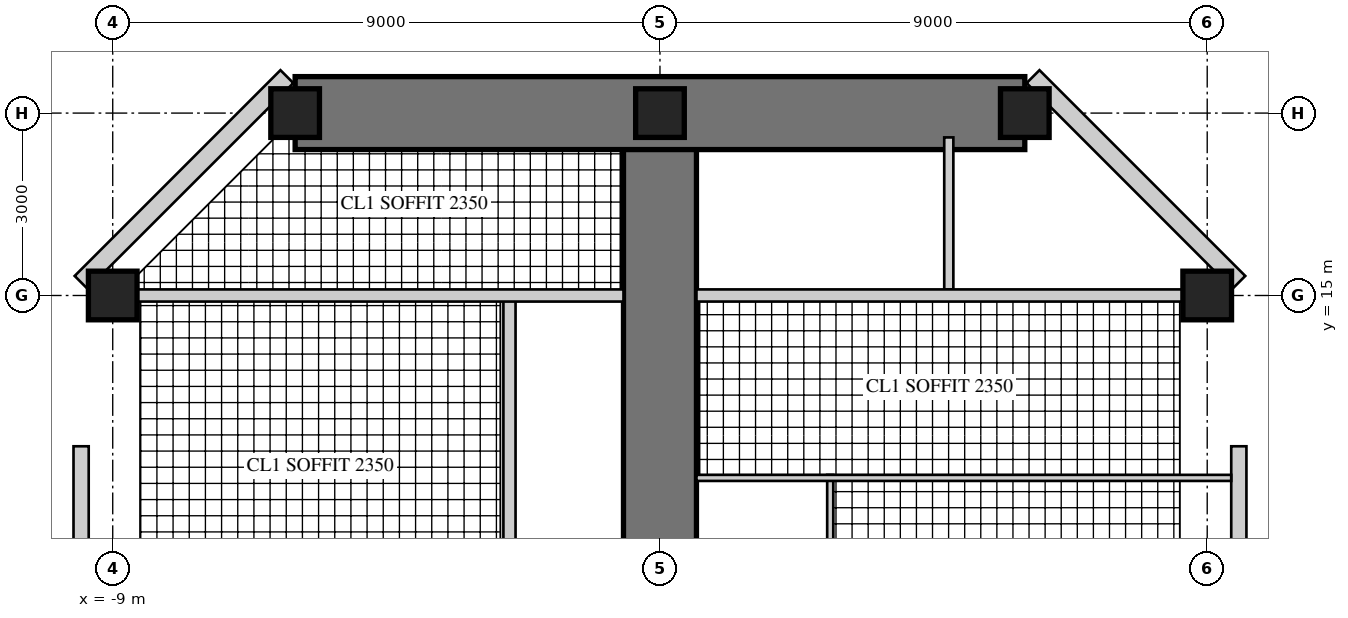
"""IFC4 building model, lengths in metres.
Left out: names, types, materials, properties, quantities, classifications, styles, units other than length and angle.
Written with IfcOpenShell. Run it as: python <this file> out.ifc"""

import sys

from ifc_helpers import new_model, si_unit, direction, frame, frame_2d, origin, origin_2d, place, context, subcontext, project, spatial, rectangle, hollow_rectangle, extrude, element, fill, save


model = new_model("IFC4")
c1 = context("Model", 3, precision=1e-05, world=origin(), true_north=direction((0.0, 1.0)))
c2 = subcontext(c1, "Body", "Model", "MODEL_VIEW")
j1 = project(units=[si_unit("LENGTHUNIT", "METRE"), si_unit("PLANEANGLEUNIT", "RADIAN")], contexts=[c1])
p1 = place(None, origin())
s1 = spatial("IfcSite", under=j1, at=p1, CompositionType="ELEMENT")
p2 = place(p1, origin())
s2 = spatial("IfcBuilding", under=s1, at=p2, CompositionType="ELEMENT")
p3 = place(p2, frame((0.0, 0.0, 242.5)))
s3 = spatial("IfcBuildingStorey", under=s2, at=p3, CompositionType="ELEMENT", Elevation=242.5)
p4 = place(p3, frame((0.0, 9.0, 0.0), z_axis=(0.0, 0.0, 1.0), x_axis=(0.0, 1.0, 0.0)))
e1 = element("IfcWall", 1, at=p4, inside=s3, PredefinedType="SHEAR", context=c2, shape_type="SweptSolid", body=[
    extrude(rectangle(XDim=9.0, YDim=1.2, at=frame_2d((4.5, 0.0))), origin(), (0.0, 0.0, 1.0), 3.4),
])
p5 = place(p4, frame((3.8, 0.0, 0.0)))
e2 = element("IfcOpeningElement", 2, at=p5, cuts=e1, PredefinedType="OPENING", context=c2, shape_type="SweptSolid", body=[
    extrude(rectangle(XDim=1.0, YDim=2.15, at=frame_2d((0.5, 1.075))), frame((0.0, 0.61, 0.0), z_axis=(0.0, -1.0, 0.0), x_axis=(1.0, 0.0, 0.0)), (0.0, 0.0, 1.0), 1.22),
])
p6 = place(p4, frame((7.0, 0.0, 0.0)))
e3 = element("IfcOpeningElement", 3, at=p6, cuts=e1, PredefinedType="OPENING", context=c2, shape_type="SweptSolid", body=[
    extrude(rectangle(XDim=1.0, YDim=2.2, at=frame_2d((0.5, 1.1))), frame((0.0, 0.61, 0.0), z_axis=(0.0, -1.0, 0.0), x_axis=(1.0, 0.0, 0.0)), (0.0, 0.0, 1.0), 1.22),
])
p7 = place(p3, frame((6.0, 18.0, 0.0), z_axis=(0.0, 0.0, 1.0), x_axis=(-1.0, 0.0, 0.0)))
e4 = element("IfcWall", 4, at=p7, inside=s3, PredefinedType="SHEAR", context=c2, shape_type="SweptSolid", body=[
    extrude(rectangle(XDim=12.0, YDim=1.2, at=frame_2d((6.0, 0.0))), origin(), (0.0, 0.0, 1.0), 3.4),
])
p8 = place(p7, frame((1.5, 0.0, 0.6)))
e5 = element("IfcOpeningElement", 5, at=p8, cuts=e4, PredefinedType="OPENING", context=c2, shape_type="SweptSolid", body=[
    extrude(rectangle(XDim=3.0, YDim=2.4, at=frame_2d((1.5, 1.2))), frame((0.0, 0.61, 0.0), z_axis=(0.0, -1.0, 0.0), x_axis=(1.0, 0.0, 0.0)), (0.0, 0.0, 1.0), 1.22),
])
p9 = place(p7, frame((7.5, 0.0, 0.6)))
e6 = element("IfcOpeningElement", 6, at=p9, cuts=e4, PredefinedType="OPENING", context=c2, shape_type="SweptSolid", body=[
    extrude(rectangle(XDim=3.0, YDim=2.4, at=frame_2d((1.5, 1.2))), frame((0.0, 0.61, 0.0), z_axis=(0.0, -1.0, 0.0), x_axis=(1.0, 0.0, 0.0)), (0.0, 0.0, 1.0), 1.22),
])
for number, where, z_axis, x_axis in (
    (7, (9.0, 15.0, 0.0), (0.0, 0.0, 1.0), (1.0, 0.0, 0.0)),
    (8, (-9.0, 15.0, 0.0), (0.0, 0.0, 1.0), (1.0, 0.0, 0.0)),
    (9, (6.0, 18.0, 0.0), (0.0, 0.0, 1.0), (1.0, 0.0, 0.0)),
    (10, (0.0, 18.0, 0.0), (0.0, 0.0, 1.0), (1.0, 0.0, 0.0)),
    (11, (-6.0, 18.0, 0.0), (0.0, 0.0, 1.0), (1.0, 0.0, 0.0)),
):
    element("IfcColumn", number, at=place(p3, frame(where, z_axis=z_axis, x_axis=x_axis)), inside=s3, PredefinedType="COLUMN", context=c2, shape_type="SweptSolid", body=[
        extrude(rectangle(XDim=0.8, YDim=0.8, at=origin_2d()), origin(), (0.0, 0.0, 1.0), 3.4),
    ])
p10 = place(p3, frame((9.52, 9.395, 0.0), z_axis=(0.0, 0.0, 1.0), x_axis=(0.0, 1.0, 0.0)))
e12 = element("IfcWall", 12, at=p10, inside=s3, PredefinedType="SOLIDWALL", context=c2, shape_type="SweptSolid", body=[
    extrude(rectangle(XDim=3.125, YDim=0.25, at=frame_2d((1.562, 0.0))), origin(), (0.0, 0.0, 1.0), 3.22),
])
p11 = place(p10, frame((0.6, 0.0, 0.0)))
e13 = element("IfcOpeningElement", 13, at=p11, cuts=e12, PredefinedType="OPENING", context=c2, shape_type="SweptSolid", body=[
    extrude(rectangle(XDim=1.0, YDim=2.2, at=frame_2d((0.5, 1.1))), frame((0.0, 0.135, 0.0), z_axis=(0.0, -1.0, 0.0), x_axis=(1.0, 0.0, 0.0)), (0.0, 0.0, 1.0), 0.27),
])
p12 = place(p3, frame((9.52, 15.215, 0.0), z_axis=(0.0, 0.0, 1.0), x_axis=(-0.707081278264, 0.707132283189, 0.0)))
e14 = element("IfcWall", 14, at=p12, inside=s3, PredefinedType="SOLIDWALL", context=c2, shape_type="SweptSolid", body=[
    extrude(rectangle(XDim=4.787, YDim=0.3, at=frame_2d((2.393, 0.0))), origin(), (0.0, 0.0, 1.0), 3.22),
])
p13 = place(p12, frame((1.943, 0.0, 0.3)))
e15 = element("IfcOpeningElement", 15, at=p13, cuts=e14, PredefinedType="OPENING", context=c2, shape_type="SweptSolid", body=[
    extrude(rectangle(XDim=0.9, YDim=2.4, at=frame_2d((0.45, 1.2))), frame((0.0, 0.16, 0.0), z_axis=(0.0, -1.0, 0.0), x_axis=(1.0, 0.0, 0.0)), (0.0, 0.0, 1.0), 0.32),
])
p14 = place(p3, frame((-6.135, 18.6, 0.0), z_axis=(0.0, 0.0, 1.0), x_axis=(-0.707081278264, -0.707132283189, 0.0)))
e16 = element("IfcWall", 16, at=p14, inside=s3, PredefinedType="SOLIDWALL", context=c2, shape_type="SweptSolid", body=[
    extrude(rectangle(XDim=4.787, YDim=0.3, at=frame_2d((2.393, 0.0))), origin(), (0.0, 0.0, 1.0), 3.22),
])
p15 = place(p14, frame((1.943, 0.0, 0.3)))
e17 = element("IfcOpeningElement", 17, at=p15, cuts=e16, PredefinedType="OPENING", context=c2, shape_type="SweptSolid", body=[
    extrude(rectangle(XDim=0.9, YDim=2.4, at=frame_2d((0.45, 1.2))), frame((0.0, 0.16, 0.0), z_axis=(0.0, -1.0, 0.0), x_axis=(1.0, 0.0, 0.0)), (0.0, 0.0, 1.0), 0.32),
])
p16 = place(p3, frame((-9.52, 12.52, 0.0), z_axis=(0.0, 0.0, 1.0), x_axis=(0.0, -1.0, 0.0)))
e18 = element("IfcWall", 18, at=p16, inside=s3, PredefinedType="SOLIDWALL", context=c2, shape_type="SweptSolid", body=[
    extrude(rectangle(XDim=2.875, YDim=0.25, at=frame_2d((1.438, 0.0))), origin(), (0.0, 0.0, 1.0), 3.22),
])
p17 = place(p16, frame((0.6, 0.0, 0.0)))
e19 = element("IfcOpeningElement", 19, at=p17, cuts=e18, PredefinedType="OPENING", context=c2, shape_type="SweptSolid", body=[
    extrude(rectangle(XDim=1.0, YDim=2.2, at=frame_2d((0.5, 1.1))), frame((0.0, 0.135, 0.0), z_axis=(0.0, -1.0, 0.0), x_axis=(1.0, 0.0, 0.0)), (0.0, 0.0, 1.0), 0.27),
])
p18 = place(p3, frame((2.8, 9.4, 0.0), z_axis=(0.0, 0.0, 1.0), x_axis=(0.0, 1.0, 0.0)))
e20 = element("IfcWall", 20, at=p18, inside=s3, PredefinedType="PARTITIONING", context=c2, shape_type="SweptSolid", body=[
    extrude(rectangle(XDim=2.65, YDim=0.1, at=frame_2d((1.325, 0.0))), origin(), (0.0, 0.0, 1.0), 3.22),
])
p19 = place(p3, frame((9.395, 12.0, 0.0), z_axis=(0.0, 0.0, 1.0), x_axis=(-1.0, 0.0, 0.0)))
e21 = element("IfcWall", 21, at=p19, inside=s3, PredefinedType="PARTITIONING", context=c2, shape_type="SweptSolid", body=[
    extrude(rectangle(XDim=8.795, YDim=0.1, at=frame_2d((4.397, 0.0))), origin(), (0.0, 0.0, 1.0), 3.22),
])
p20 = place(p19, frame((5.245, 0.0, 0.0)))
e22 = element("IfcOpeningElement", 22, at=p20, cuts=e21, PredefinedType="OPENING", context=c2, shape_type="SweptSolid", body=[
    extrude(rectangle(XDim=0.9, YDim=2.1, at=frame_2d((0.45, 1.05))), frame((0.0, 0.06, 0.0), z_axis=(0.0, -1.0, 0.0), x_axis=(1.0, 0.0, 0.0)), (0.0, 0.0, 1.0), 0.12),
])
p21 = place(p19, frame((7.345, 0.0, 0.0)))
e23 = element("IfcOpeningElement", 23, at=p21, cuts=e21, PredefinedType="OPENING", context=c2, shape_type="SweptSolid", body=[
    extrude(rectangle(XDim=0.9, YDim=2.1, at=frame_2d((0.45, 1.05))), frame((0.0, 0.06, 0.0), z_axis=(0.0, -1.0, 0.0), x_axis=(1.0, 0.0, 0.0)), (0.0, 0.0, 1.0), 0.12),
])
p22 = place(p3, frame((-2.475, 9.4, 0.0), z_axis=(0.0, 0.0, 1.0), x_axis=(0.0, 1.0, 0.0)))
e24 = element("IfcWall", 24, at=p22, inside=s3, PredefinedType="SOLIDWALL", context=c2, shape_type="SweptSolid", body=[
    extrude(rectangle(XDim=5.6, YDim=0.2, at=frame_2d((2.8, 0.0))), origin(), (0.0, 0.0, 1.0), 3.22),
])
p23 = place(p22, frame((1.2, 0.0, 0.0)))
e25 = element("IfcOpeningElement", 25, at=p23, cuts=e24, PredefinedType="OPENING", context=c2, shape_type="SweptSolid", body=[
    extrude(rectangle(XDim=1.0, YDim=2.2, at=frame_2d((0.5, 1.1))), frame((0.0, 0.11, 0.0), z_axis=(0.0, -1.0, 0.0), x_axis=(1.0, 0.0, 0.0)), (0.0, 0.0, 1.0), 0.22),
])
p24 = place(p3, frame((4.75, 15.1, 0.0), z_axis=(0.0, 0.0, 1.0), x_axis=(0.0, 1.0, 0.0)))
e26 = element("IfcWall", 26, at=p24, inside=s3, PredefinedType="PARTITIONING", context=c2, shape_type="SweptSolid", body=[
    extrude(rectangle(XDim=2.5, YDim=0.15, at=frame_2d((1.25, 0.0))), origin(), (0.0, 0.0, 1.0), 3.22),
])
p25 = place(p24, frame((0.6, 0.0, 0.0)))
e27 = element("IfcOpeningElement", 27, at=p25, cuts=e26, PredefinedType="OPENING", context=c2, shape_type="SweptSolid", body=[
    extrude(rectangle(XDim=1.0, YDim=2.1, at=frame_2d((0.5, 1.05))), frame((0.0, 0.085, 0.0), z_axis=(0.0, -1.0, 0.0), x_axis=(1.0, 0.0, 0.0)), (0.0, 0.0, 1.0), 0.17),
])
p26 = place(p3, frame((8.6, 15.0, 0.0), z_axis=(0.0, 0.0, 1.0), x_axis=(-1.0, 0.0, 0.0)))
e28 = element("IfcWall", 28, at=p26, inside=s3, PredefinedType="SOLIDWALL", context=c2, shape_type="SweptSolid", body=[
    extrude(rectangle(XDim=8.0, YDim=0.2, at=frame_2d((4.0, 0.0))), origin(), (0.0, 0.0, 1.0), 2.52),
])
p27 = place(p3, frame((-0.6, 15.0, 0.0), z_axis=(0.0, 0.0, 1.0), x_axis=(-1.0, 0.0, 0.0)))
e29 = element("IfcWall", 29, at=p27, inside=s3, PredefinedType="SOLIDWALL", context=c2, shape_type="SweptSolid", body=[
    extrude(rectangle(XDim=8.0, YDim=0.2, at=frame_2d((4.0, 0.0))), origin(), (0.0, 0.0, 1.0), 2.52),
])
p28 = place(p27, frame((0.35, 0.0, 0.0)))
e30 = element("IfcOpeningElement", 30, at=p28, cuts=e29, PredefinedType="OPENING", context=c2, shape_type="SweptSolid", body=[
    extrude(rectangle(XDim=1.0, YDim=2.2, at=frame_2d((0.5, 1.1))), frame((0.0, 0.11, 0.0), z_axis=(0.0, -1.0, 0.0), x_axis=(1.0, 0.0, 0.0)), (0.0, 0.0, 1.0), 0.22),
])
p29 = place(p13, origin())
e31 = element("IfcWindow", 31, at=p29, inside=s3, PartitioningType="SINGLE_PANEL", PredefinedType="WINDOW", context=c2, shape_type="SweptSolid", body=[
    extrude(hollow_rectangle(XDim=0.9, YDim=2.4, WallThickness=0.06, at=frame_2d((0.45, 1.2))), frame((0.0, 0.03, 0.0), z_axis=(0.0, -1.0, 0.0), x_axis=(1.0, 0.0, 0.0)), (0.0, 0.0, 1.0), 0.06),
    extrude(rectangle(XDim=0.779, YDim=2.279, at=frame_2d((0.45, 1.2))), frame((0.0, 0.03, 0.0), z_axis=(0.0, -1.0, 0.0), x_axis=(1.0, 0.0, 0.0)), (0.0, 0.0, 1.0), 0.06),
])
fill(e15, e31)
p30 = place(p8, origin())
e32 = element("IfcWindow", 32, at=p30, inside=s3, PartitioningType="SINGLE_PANEL", PredefinedType="WINDOW", context=c2, shape_type="SweptSolid", body=[
    extrude(hollow_rectangle(XDim=3.0, YDim=2.4, WallThickness=0.06, at=frame_2d((1.5, 1.2))), frame((0.0, 0.03, 0.0), z_axis=(0.0, -1.0, 0.0), x_axis=(1.0, 0.0, 0.0)), (0.0, 0.0, 1.0), 0.06),
    extrude(rectangle(XDim=2.879, YDim=2.279, at=frame_2d((1.5, 1.2))), frame((0.0, 0.03, 0.0), z_axis=(0.0, -1.0, 0.0), x_axis=(1.0, 0.0, 0.0)), (0.0, 0.0, 1.0), 0.06),
])
fill(e5, e32)
p31 = place(p9, origin())
e33 = element("IfcWindow", 33, at=p31, inside=s3, PartitioningType="SINGLE_PANEL", PredefinedType="WINDOW", context=c2, shape_type="SweptSolid", body=[
    extrude(hollow_rectangle(XDim=3.0, YDim=2.4, WallThickness=0.06, at=frame_2d((1.5, 1.2))), frame((0.0, 0.03, 0.0), z_axis=(0.0, -1.0, 0.0), x_axis=(1.0, 0.0, 0.0)), (0.0, 0.0, 1.0), 0.06),
    extrude(rectangle(XDim=2.879, YDim=2.279, at=frame_2d((1.5, 1.2))), frame((0.0, 0.03, 0.0), z_axis=(0.0, -1.0, 0.0), x_axis=(1.0, 0.0, 0.0)), (0.0, 0.0, 1.0), 0.06),
])
fill(e6, e33)
p32 = place(p15, origin())
e34 = element("IfcWindow", 34, at=p32, inside=s3, PartitioningType="SINGLE_PANEL", PredefinedType="WINDOW", context=c2, shape_type="SweptSolid", body=[
    extrude(hollow_rectangle(XDim=0.9, YDim=2.4, WallThickness=0.06, at=frame_2d((0.45, 1.2))), frame((0.0, 0.03, 0.0), z_axis=(0.0, -1.0, 0.0), x_axis=(1.0, 0.0, 0.0)), (0.0, 0.0, 1.0), 0.06),
    extrude(rectangle(XDim=0.779, YDim=2.279, at=frame_2d((0.45, 1.2))), frame((0.0, 0.03, 0.0), z_axis=(0.0, -1.0, 0.0), x_axis=(1.0, 0.0, 0.0)), (0.0, 0.0, 1.0), 0.06),
])
fill(e17, e34)
p33 = place(p17, origin())
e35 = element("IfcDoor", 35, at=p33, inside=s3, OperationType="SINGLE_SWING_RIGHT", PredefinedType="DOOR", context=c2, shape_type="SweptSolid", body=[
    extrude(hollow_rectangle(XDim=1.0, YDim=2.2, WallThickness=0.06, at=frame_2d((0.5, 1.1))), frame((0.0, 0.025, 0.0), z_axis=(0.0, -1.0, 0.0), x_axis=(1.0, 0.0, 0.0)), (0.0, 0.0, 1.0), 0.05),
    extrude(rectangle(XDim=0.879, YDim=2.079, at=frame_2d((0.5, 1.1))), frame((0.0, 0.025, 0.0), z_axis=(0.0, -1.0, 0.0), x_axis=(1.0, 0.0, 0.0)), (0.0, 0.0, 1.0), 0.05),
])
fill(e19, e35)
p34 = place(p20, origin())
e36 = element("IfcDoor", 36, at=p34, inside=s3, OperationType="SINGLE_SWING_RIGHT", PredefinedType="DOOR", context=c2, shape_type="SweptSolid", body=[
    extrude(rectangle(XDim=0.9, YDim=2.1, at=frame_2d((0.45, 1.05))), frame((0.0, 0.025, 0.0), z_axis=(0.0, -1.0, 0.0), x_axis=(1.0, 0.0, 0.0)), (0.0, 0.0, 1.0), 0.05),
])
fill(e22, e36)
p35 = place(p21, origin())
e37 = element("IfcDoor", 37, at=p35, inside=s3, OperationType="SINGLE_SWING_RIGHT", PredefinedType="DOOR", context=c2, shape_type="SweptSolid", body=[
    extrude(rectangle(XDim=0.9, YDim=2.1, at=frame_2d((0.45, 1.05))), frame((0.0, 0.025, 0.0), z_axis=(0.0, -1.0, 0.0), x_axis=(1.0, 0.0, 0.0)), (0.0, 0.0, 1.0), 0.05),
])
fill(e23, e37)
p36 = place(p23, origin())
e38 = element("IfcDoor", 38, at=p36, inside=s3, OperationType="SINGLE_SWING_LEFT", PredefinedType="DOOR", context=c2, shape_type="SweptSolid", body=[
    extrude(rectangle(XDim=1.0, YDim=2.2, at=frame_2d((0.5, 1.1))), frame((0.0, 0.025, 0.0), z_axis=(0.0, -1.0, 0.0), x_axis=(1.0, 0.0, 0.0)), (0.0, 0.0, 1.0), 0.05),
])
fill(e25, e38)
p37 = place(p25, frame((1.0, 0.0, 0.0), z_axis=(0.0, 0.0, 1.0), x_axis=(-1.0, 0.0, 0.0)))
e39 = element("IfcDoor", 39, at=p37, inside=s3, OperationType="SINGLE_SWING_RIGHT", PredefinedType="DOOR", context=c2, shape_type="SweptSolid", body=[
    extrude(rectangle(XDim=1.0, YDim=2.1, at=frame_2d((0.5, 1.05))), frame((0.0, 0.025, 0.0), z_axis=(0.0, -1.0, 0.0), x_axis=(1.0, 0.0, 0.0)), (0.0, 0.0, 1.0), 0.05),
])
fill(e27, e39)
p38 = place(p28, frame((1.0, 0.0, 0.0), z_axis=(0.0, 0.0, 1.0), x_axis=(-1.0, 0.0, 0.0)))
e40 = element("IfcDoor", 40, at=p38, inside=s3, OperationType="SINGLE_SWING_RIGHT", PredefinedType="DOOR", context=c2, shape_type="SweptSolid", body=[
    extrude(rectangle(XDim=1.0, YDim=2.2, at=frame_2d((0.5, 1.1))), frame((0.0, 0.025, 0.0), z_axis=(0.0, -1.0, 0.0), x_axis=(1.0, 0.0, 0.0)), (0.0, 0.0, 1.0), 0.05),
])
fill(e30, e40)
p39 = place(p5, frame((1.0, 0.0, 0.0), z_axis=(0.0, 0.0, 1.0), x_axis=(-1.0, 0.0, 0.0)))
e41 = element("IfcDoor", 41, at=p39, inside=s3, OperationType="SINGLE_SWING_RIGHT", PredefinedType="DOOR", context=c2, shape_type="SweptSolid", body=[
    extrude(rectangle(XDim=1.0, YDim=2.15, at=frame_2d((0.5, 1.075))), frame((0.0, 0.025, 0.0), z_axis=(0.0, -1.0, 0.0), x_axis=(1.0, 0.0, 0.0)), (0.0, 0.0, 1.0), 0.05),
])
fill(e2, e41)
p40 = place(p6, frame((1.0, 0.0, 0.0), z_axis=(0.0, 0.0, 1.0), x_axis=(-1.0, 0.0, 0.0)))
e42 = element("IfcDoor", 42, at=p40, inside=s3, OperationType="SINGLE_SWING_LEFT", PredefinedType="DOOR", context=c2, shape_type="SweptSolid", body=[
    extrude(rectangle(XDim=1.0, YDim=2.2, at=frame_2d((0.5, 1.1))), frame((0.0, 0.025, 0.0), z_axis=(0.0, -1.0, 0.0), x_axis=(1.0, 0.0, 0.0)), (0.0, 0.0, 1.0), 0.05),
])
fill(e3, e42)
save(model, sys.argv[1])
